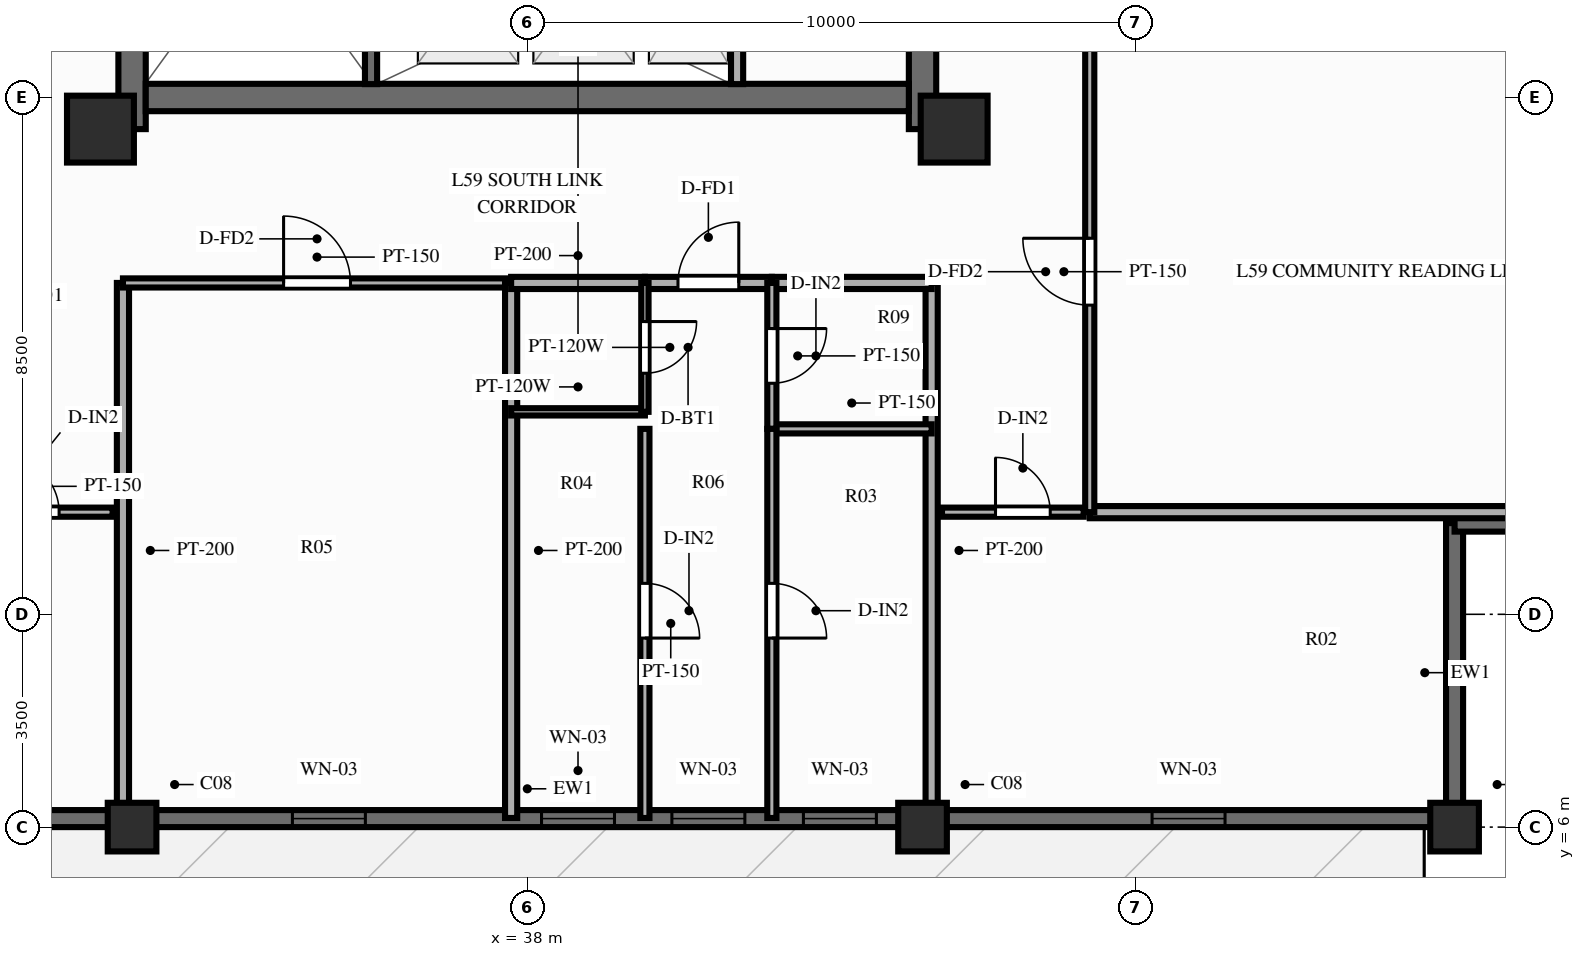
"""IFC4 building model, lengths in metres.
Left out: names, types, materials, properties, quantities, classifications, styles, units other than length and angle.
Written with IfcOpenShell. Run it as: python <this file> out.ifc"""

import sys

from ifc_helpers import new_model, si_unit, direction, frame, frame_2d, origin, origin_2d, place, context, subcontext, project, spatial, rectangle, extrude, source, transform, mapped, element, fill, save


model = new_model("IFC4")
c1 = context("Model", 3, precision=1e-05, world=origin(), true_north=direction((0.0, 1.0)))
c2 = subcontext(c1, "Body", "Model", "MODEL_VIEW")
j1 = project(units=[si_unit("LENGTHUNIT", "METRE"), si_unit("PLANEANGLEUNIT", "RADIAN")], contexts=[c1])
p1 = place(None, origin())
s1 = spatial("IfcSite", under=j1, at=p1, CompositionType="ELEMENT")
p2 = place(p1, origin())
s2 = spatial("IfcBuilding", under=s1, at=p2, CompositionType="ELEMENT")
p3 = place(p2, frame((0.0, 0.0, 189.7)))
s3 = spatial("IfcBuildingStorey", under=s2, at=p3, CompositionType="ELEMENT", Elevation=189.7)
p4 = place(p3, frame((31.5, 17.48, 0.0), z_axis=(0.0, 0.0, 1.0), x_axis=(0.0, 1.0, 0.0)))
e1 = element("IfcWall", 1, at=p4, inside=s3, PredefinedType="SHEAR", context=c2, shape_type="SweptSolid", body=[
    extrude(rectangle(XDim=19.04, YDim=0.45, at=frame_2d((9.52, 0.0))), origin(), (0.0, 0.0, 1.0), 3.0),
])
p5 = place(p4, frame((6.32, 0.0, 0.0)))
e2 = element("IfcOpeningElement", 2, at=p5, cuts=e1, PredefinedType="OPENING", context=c2, shape_type="SweptSolid", body=[
    extrude(rectangle(XDim=1.1, YDim=2.15, at=frame_2d((0.55, 1.075))), frame((0.0, 0.237, 0.0), z_axis=(0.0, -1.0, 0.0), x_axis=(1.0, 0.0, 0.0)), (0.0, 0.0, 1.0), 0.474),
])
p6 = place(p3, frame((44.5, 17.48, 0.0), z_axis=(0.0, 0.0, 1.0), x_axis=(0.0, 1.0, 0.0)))
e3 = element("IfcWall", 3, at=p6, inside=s3, PredefinedType="SHEAR", context=c2, shape_type="SweptSolid", body=[
    extrude(rectangle(XDim=19.04, YDim=0.45, at=frame_2d((9.52, 0.0))), origin(), (0.0, 0.0, 1.0), 3.0),
])
p7 = place(p6, frame((12.67, 0.0, 0.0), z_axis=(0.0, 0.0, 1.0), x_axis=(-1.0, 0.0, 0.0)))
e4 = element("IfcOpeningElement", 4, at=p7, cuts=e3, PredefinedType="OPENING", context=c2, shape_type="SweptSolid", body=[
    extrude(rectangle(XDim=1.1, YDim=2.15, at=frame_2d((0.55, 1.075))), frame((0.0, 0.237, 0.0), z_axis=(0.0, -1.0, 0.0), x_axis=(1.0, 0.0, 0.0)), (0.0, 0.0, 1.0), 0.474),
])
p8 = place(p3, frame((31.725, 18.0, 0.0), z_axis=(0.0, 0.0, 1.0), x_axis=(1.0, 0.0, 0.0)))
e5 = element("IfcWall", 5, at=p8, inside=s3, PredefinedType="SHEAR", context=c2, shape_type="SweptSolid", body=[
    extrude(rectangle(XDim=12.55, YDim=0.45, at=frame_2d((6.275, 0.0))), origin(), (0.0, 0.0, 1.0), 3.0),
])
m1 = source(origin(), c2, "Body", "SweptSolid", [
    extrude(rectangle(XDim=1.1, YDim=1.1, at=origin_2d()), origin(), (0.0, 0.0, 1.0), 3.0),
])
for number, where, z_axis, x_axis in (
    (6, (30.98, 17.48, 0.0), (0.0, 0.0, 1.0), (1.0, 0.0, 0.0)),
    (7, (45.02, 17.48, 0.0), (0.0, 0.0, 1.0), (1.0, 0.0, 0.0)),
):
    element("IfcColumn", number, at=place(p3, frame(where, z_axis=z_axis, x_axis=x_axis)), inside=s3, PredefinedType="COLUMN", context=c2, shape_type="MappedRepresentation", body=[
        mapped(m1, transform((0.0, 0.0, 0.0), scale=1.0)),
    ])
m2 = source(origin(), c2, "Body", "SweptSolid", [
    extrude(rectangle(XDim=0.8, YDim=0.8, at=origin_2d()), origin(), (0.0, 0.0, 1.0), 3.0),
])
for number, where, z_axis, x_axis in (
    (8, (31.5, 6.0, 0.0), (0.0, 0.0, 1.0), (1.0, 0.0, 0.0)),
    (9, (44.5, 6.0, 0.0), (0.0, 0.0, 1.0), (1.0, 0.0, 0.0)),
    (10, (53.25, 6.0, 0.0), (0.0, 0.0, 1.0), (1.0, 0.0, 0.0)),
):
    element("IfcColumn", number, at=place(p3, frame(where, z_axis=z_axis, x_axis=x_axis)), inside=s3, PredefinedType="COLUMN", context=c2, shape_type="MappedRepresentation", body=[
        mapped(m2, transform((0.0, 0.0, 0.0), scale=1.0)),
    ])
p9 = place(p3, frame((22.75, 6.14, 0.0), z_axis=(0.0, 0.0, 1.0), x_axis=(1.0, 0.0, 0.0)))
e11 = element("IfcWall", 11, at=p9, inside=s3, PredefinedType="SOLIDWALL", context=c2, shape_type="SweptSolid", body=[
    extrude(rectangle(XDim=30.5, YDim=0.28, at=frame_2d((15.25, 0.0))), origin(), (0.0, 0.0, 1.0), 2.28),
])
p10 = place(p9, frame((4.925, 0.0, 0.0), z_axis=(0.0, 0.0, 1.0), x_axis=(-1.0, 0.0, 0.0)))
e12 = element("IfcOpeningElement", 12, at=p10, cuts=e11, PredefinedType="OPENING", context=c2, shape_type="SweptSolid", body=[
    extrude(rectangle(XDim=1.1, YDim=2.15, at=frame_2d((0.55, 1.075))), frame((0.0, 0.152, 0.0), z_axis=(0.0, -1.0, 0.0), x_axis=(1.0, 0.0, 0.0)), (0.0, 0.0, 1.0), 0.304),
])
p11 = place(p9, frame((11.387, 0.0, 0.25)))
e13 = element("IfcOpeningElement", 13, at=p11, cuts=e11, PredefinedType="OPENING", context=c2, shape_type="SweptSolid", body=[
    extrude(rectangle(XDim=1.2, YDim=1.5, at=frame_2d((0.6, 0.75))), frame((0.0, 0.152, 0.0), z_axis=(0.0, -1.0, 0.0), x_axis=(1.0, 0.0, 0.0)), (0.0, 0.0, 1.0), 0.304),
])
p12 = place(p9, frame((15.484, 0.0, 0.25)))
e14 = element("IfcOpeningElement", 14, at=p12, cuts=e11, PredefinedType="OPENING", context=c2, shape_type="SweptSolid", body=[
    extrude(rectangle(XDim=1.2, YDim=1.5, at=frame_2d((0.6, 0.75))), frame((0.0, 0.152, 0.0), z_axis=(0.0, -1.0, 0.0), x_axis=(1.0, 0.0, 0.0)), (0.0, 0.0, 1.0), 0.304),
])
p13 = place(p9, frame((17.628, 0.0, 0.25)))
e15 = element("IfcOpeningElement", 15, at=p13, cuts=e11, PredefinedType="OPENING", context=c2, shape_type="SweptSolid", body=[
    extrude(rectangle(XDim=1.2, YDim=1.5, at=frame_2d((0.6, 0.75))), frame((0.0, 0.152, 0.0), z_axis=(0.0, -1.0, 0.0), x_axis=(1.0, 0.0, 0.0)), (0.0, 0.0, 1.0), 0.304),
])
p14 = place(p9, frame((19.791, 0.0, 0.25)))
e16 = element("IfcOpeningElement", 16, at=p14, cuts=e11, PredefinedType="OPENING", context=c2, shape_type="SweptSolid", body=[
    extrude(rectangle(XDim=1.2, YDim=1.5, at=frame_2d((0.6, 0.75))), frame((0.0, 0.152, 0.0), z_axis=(0.0, -1.0, 0.0), x_axis=(1.0, 0.0, 0.0)), (0.0, 0.0, 1.0), 0.304),
])
p15 = place(p9, frame((25.525, 0.0, 0.25)))
e17 = element("IfcOpeningElement", 17, at=p15, cuts=e11, PredefinedType="OPENING", context=c2, shape_type="SweptSolid", body=[
    extrude(rectangle(XDim=1.2, YDim=1.5, at=frame_2d((0.6, 0.75))), frame((0.0, 0.152, 0.0), z_axis=(0.0, -1.0, 0.0), x_axis=(1.0, 0.0, 0.0)), (0.0, 0.0, 1.0), 0.304),
])
for number, where, z_axis, x_axis in (
    (18, (53.25, 6.08, 0.0), (0.0, 0.0, 1.0), (0.0, 1.0, 0.0)),
    (19, (53.25, 11.0, 0.0), (0.0, 0.0, 1.0), (1.0, 0.0, 0.0)),
):
    element("IfcWall", number, at=place(p3, frame(where, z_axis=z_axis, x_axis=x_axis)), inside=s3, PredefinedType="SOLIDWALL", context=c2, shape_type="SweptSolid", body=[
        extrude(rectangle(XDim=4.92, YDim=0.28, at=frame_2d((2.46, 0.0))), origin(), (0.0, 0.0, 1.0), 2.28),
    ])
p16 = place(p3, frame((41.45, 18.22, 0.0), z_axis=(0.0, 0.0, 1.0), x_axis=(0.0, 1.0, 0.0)))
e20 = element("IfcWall", 20, at=p16, inside=s3, PredefinedType="PARTITIONING", context=c2, shape_type="SweptSolid", body=[
    extrude(rectangle(XDim=2.96, YDim=0.2, at=frame_2d((1.48, 0.0))), origin(), (0.0, 0.0, 1.0), 2.79),
])
p17 = place(p3, frame((35.43, 18.22, 0.0), z_axis=(0.0, 0.0, 1.0), x_axis=(0.0, 1.0, 0.0)))
e21 = element("IfcWall", 21, at=p17, inside=s3, PredefinedType="SOLIDWALL", context=c2, shape_type="SweptSolid", body=[
    extrude(rectangle(XDim=7.22, YDim=0.2, at=frame_2d((3.61, 0.0))), origin(), (0.0, 0.0, 1.0), 2.79),
])
p18 = place(p17, frame((6.68, 0.0, 0.0), z_axis=(0.0, 0.0, 1.0), x_axis=(-1.0, 0.0, 0.0)))
e22 = element("IfcOpeningElement", 22, at=p18, cuts=e21, PredefinedType="OPENING", context=c2, shape_type="SweptSolid", body=[
    extrude(rectangle(XDim=1.1, YDim=2.15, at=frame_2d((0.55, 1.075))), frame((0.0, 0.112, 0.0), z_axis=(0.0, -1.0, 0.0), x_axis=(1.0, 0.0, 0.0)), (0.0, 0.0, 1.0), 0.224),
])
p19 = place(p3, frame((28.85, 11.18, 0.0), z_axis=(0.0, 0.0, 1.0), x_axis=(1.0, 0.0, 0.0)))
e23 = element("IfcWall", 23, at=p19, inside=s3, PredefinedType="PARTITIONING", context=c2, shape_type="SweptSolid", body=[
    extrude(rectangle(XDim=2.33, YDim=0.15, at=frame_2d((1.165, 0.0))), origin(), (0.0, 0.0, 1.0), 2.79),
])
p20 = place(p19, frame((0.55, 0.0, 0.0)))
e24 = element("IfcOpeningElement", 24, at=p20, cuts=e23, PredefinedType="OPENING", context=c2, shape_type="SweptSolid", body=[
    extrude(rectangle(XDim=0.9, YDim=2.1, at=frame_2d((0.45, 1.05))), frame((0.0, 0.087, 0.0), z_axis=(0.0, -1.0, 0.0), x_axis=(1.0, 0.0, 0.0)), (0.0, 0.0, 1.0), 0.174),
])
p21 = place(p3, frame((44.82, 11.18, 0.0), z_axis=(0.0, 0.0, 1.0), x_axis=(1.0, 0.0, 0.0)))
e25 = element("IfcWall", 25, at=p21, inside=s3, PredefinedType="PARTITIONING", context=c2, shape_type="SweptSolid", body=[
    extrude(rectangle(XDim=2.33, YDim=0.15, at=frame_2d((1.165, 0.0))), origin(), (0.0, 0.0, 1.0), 2.79),
])
p22 = place(p21, frame((0.88, 0.0, 0.0)))
e26 = element("IfcOpeningElement", 26, at=p22, cuts=e25, PredefinedType="OPENING", context=c2, shape_type="SweptSolid", body=[
    extrude(rectangle(XDim=0.9, YDim=2.1, at=frame_2d((0.45, 1.05))), frame((0.0, 0.087, 0.0), z_axis=(0.0, -1.0, 0.0), x_axis=(1.0, 0.0, 0.0)), (0.0, 0.0, 1.0), 0.174),
])
for number, where, z_axis, x_axis in (
    (27, (31.35, 14.95, 0.0), (0.0, 0.0, 1.0), (0.0, -1.0, 0.0)),
    (28, (44.65, 14.95, 0.0), (0.0, 0.0, 1.0), (0.0, -1.0, 0.0)),
):
    element("IfcWall", number, at=place(p3, frame(where, z_axis=z_axis, x_axis=x_axis)), inside=s3, PredefinedType="PARTITIONING", context=c2, shape_type="SweptSolid", body=[
        extrude(rectangle(XDim=8.8, YDim=0.2, at=frame_2d((4.4, 0.0))), origin(), (0.0, 0.0, 1.0), 2.39),
    ])
p23 = place(p3, frame((31.35, 14.95, 0.0), z_axis=(0.0, 0.0, 1.0), x_axis=(1.0, 0.0, 0.0)))
e29 = element("IfcWall", 29, at=p23, inside=s3, PredefinedType="PARTITIONING", context=c2, shape_type="SweptSolid", body=[
    extrude(rectangle(XDim=6.384, YDim=0.15, at=frame_2d((3.192, 0.0))), origin(), (0.0, 0.0, 1.0), 2.79),
])
p24 = place(p23, frame((2.642, 0.0, 0.0)))
e30 = element("IfcOpeningElement", 30, at=p24, cuts=e29, PredefinedType="OPENING", context=c2, shape_type="SweptSolid", body=[
    extrude(rectangle(XDim=1.1, YDim=2.15, at=frame_2d((0.55, 1.075))), frame((0.0, 0.087, 0.0), z_axis=(0.0, -1.0, 0.0), x_axis=(1.0, 0.0, 0.0)), (0.0, 0.0, 1.0), 0.174),
])
p25 = place(p3, frame((37.734, 14.95, 0.0), z_axis=(0.0, 0.0, 1.0), x_axis=(0.0, -1.0, 0.0)))
e31 = element("IfcWall", 31, at=p25, inside=s3, PredefinedType="PARTITIONING", context=c2, shape_type="SweptSolid", body=[
    extrude(rectangle(XDim=8.8, YDim=0.2, at=frame_2d((4.4, 0.0))), origin(), (0.0, 0.0, 1.0), 2.79),
])
p26 = place(p3, frame((37.734, 14.95, 0.0), z_axis=(0.0, 0.0, 1.0), x_axis=(1.0, 0.0, 0.0)))
e32 = element("IfcWall", 32, at=p26, inside=s3, PredefinedType="PARTITIONING", context=c2, shape_type="SweptSolid", body=[
    extrude(rectangle(XDim=2.2, YDim=0.2, at=frame_2d((1.1, 0.0))), origin(), (0.0, 0.0, 1.0), 2.79),
])
p27 = place(p3, frame((39.934, 14.95, 0.0), z_axis=(0.0, 0.0, 1.0), x_axis=(1.0, 0.0, 0.0)))
e33 = element("IfcWall", 33, at=p27, inside=s3, PredefinedType="PARTITIONING", context=c2, shape_type="SweptSolid", body=[
    extrude(rectangle(XDim=2.088, YDim=0.2, at=frame_2d((1.044, 0.0))), origin(), (0.0, 0.0, 1.0), 2.79),
])
p28 = place(p27, frame((0.544, 0.0, 0.0)))
e34 = element("IfcOpeningElement", 34, at=p28, cuts=e33, PredefinedType="OPENING", context=c2, shape_type="SweptSolid", body=[
    extrude(rectangle(XDim=1.0, YDim=2.15, at=frame_2d((0.5, 1.075))), frame((0.0, 0.112, 0.0), z_axis=(0.0, -1.0, 0.0), x_axis=(1.0, 0.0, 0.0)), (0.0, 0.0, 1.0), 0.224),
])
p29 = place(p3, frame((42.022, 14.95, 0.0), z_axis=(0.0, 0.0, 1.0), x_axis=(1.0, 0.0, 0.0)))
e35 = element("IfcWall", 35, at=p29, inside=s3, PredefinedType="PARTITIONING", context=c2, shape_type="SweptSolid", body=[
    extrude(rectangle(XDim=2.628, YDim=0.2, at=frame_2d((1.314, 0.0))), origin(), (0.0, 0.0, 1.0), 2.79),
])
p30 = place(p3, frame((37.734, 12.83, 0.0), z_axis=(0.0, 0.0, 1.0), x_axis=(1.0, 0.0, 0.0)))
e36 = element("IfcWall", 36, at=p30, inside=s3, PredefinedType="PARTITIONING", context=c2, shape_type="SweptSolid", body=[
    extrude(rectangle(XDim=2.2, YDim=0.12, at=frame_2d((1.1, 0.0))), origin(), (0.0, 0.0, 1.0), 2.79),
])
p31 = place(p3, frame((42.022, 12.55, 0.0), z_axis=(0.0, 0.0, 1.0), x_axis=(1.0, 0.0, 0.0)))
e37 = element("IfcWall", 37, at=p31, inside=s3, PredefinedType="PARTITIONING", context=c2, shape_type="SweptSolid", body=[
    extrude(rectangle(XDim=2.628, YDim=0.15, at=frame_2d((1.314, 0.0))), origin(), (0.0, 0.0, 1.0), 2.79),
])
p32 = place(p3, frame((39.934, 14.95, 0.0), z_axis=(0.0, 0.0, 1.0), x_axis=(0.0, -1.0, 0.0)))
e38 = element("IfcWall", 38, at=p32, inside=s3, PredefinedType="PARTITIONING", context=c2, shape_type="SweptSolid", body=[
    extrude(rectangle(XDim=2.12, YDim=0.12, at=frame_2d((1.06, 0.0))), origin(), (0.0, 0.0, 1.0), 2.79),
])
p33 = place(p32, frame((0.635, 0.0, 0.0)))
e39 = element("IfcOpeningElement", 39, at=p33, cuts=e38, PredefinedType="OPENING", context=c2, shape_type="SweptSolid", body=[
    extrude(rectangle(XDim=0.85, YDim=2.05, at=frame_2d((0.425, 1.025))), frame((0.0, 0.072, 0.0), z_axis=(0.0, -1.0, 0.0), x_axis=(1.0, 0.0, 0.0)), (0.0, 0.0, 1.0), 0.144),
])
p34 = place(p3, frame((39.934, 12.55, 0.0), z_axis=(0.0, 0.0, 1.0), x_axis=(0.0, -1.0, 0.0)))
e40 = element("IfcWall", 40, at=p34, inside=s3, PredefinedType="PARTITIONING", context=c2, shape_type="SweptSolid", body=[
    extrude(rectangle(XDim=6.4, YDim=0.15, at=frame_2d((3.2, 0.0))), origin(), (0.0, 0.0, 1.0), 2.79),
])
p35 = place(p34, frame((2.541, 0.0, 0.0)))
e41 = element("IfcOpeningElement", 41, at=p35, cuts=e40, PredefinedType="OPENING", context=c2, shape_type="SweptSolid", body=[
    extrude(rectangle(XDim=0.9, YDim=2.1, at=frame_2d((0.45, 1.05))), frame((0.0, 0.087, 0.0), z_axis=(0.0, -1.0, 0.0), x_axis=(1.0, 0.0, 0.0)), (0.0, 0.0, 1.0), 0.174),
])
p36 = place(p3, frame((42.022, 14.95, 0.0), z_axis=(0.0, 0.0, 1.0), x_axis=(0.0, -1.0, 0.0)))
e42 = element("IfcWall", 42, at=p36, inside=s3, PredefinedType="PARTITIONING", context=c2, shape_type="SweptSolid", body=[
    extrude(rectangle(XDim=2.4, YDim=0.15, at=frame_2d((1.2, 0.0))), origin(), (0.0, 0.0, 1.0), 2.79),
])
p37 = place(p36, frame((0.75, 0.0, 0.0)))
e43 = element("IfcOpeningElement", 43, at=p37, cuts=e42, PredefinedType="OPENING", context=c2, shape_type="SweptSolid", body=[
    extrude(rectangle(XDim=0.9, YDim=2.1, at=frame_2d((0.45, 1.05))), frame((0.0, 0.087, 0.0), z_axis=(0.0, -1.0, 0.0), x_axis=(1.0, 0.0, 0.0)), (0.0, 0.0, 1.0), 0.174),
])
p38 = place(p3, frame((42.022, 12.55, 0.0), z_axis=(0.0, 0.0, 1.0), x_axis=(0.0, -1.0, 0.0)))
e44 = element("IfcWall", 44, at=p38, inside=s3, PredefinedType="PARTITIONING", context=c2, shape_type="SweptSolid", body=[
    extrude(rectangle(XDim=6.4, YDim=0.15, at=frame_2d((3.2, 0.0))), origin(), (0.0, 0.0, 1.0), 2.79),
])
p39 = place(p38, frame((2.541, 0.0, 0.0)))
e45 = element("IfcOpeningElement", 45, at=p39, cuts=e44, PredefinedType="OPENING", context=c2, shape_type="SweptSolid", body=[
    extrude(rectangle(XDim=0.9, YDim=2.1, at=frame_2d((0.45, 1.05))), frame((0.0, 0.087, 0.0), z_axis=(0.0, -1.0, 0.0), x_axis=(1.0, 0.0, 0.0)), (0.0, 0.0, 1.0), 0.174),
])
p40 = place(p3, frame((47.25, 11.18, 0.0), z_axis=(0.0, 0.0, 1.0), x_axis=(1.0, 0.0, 0.0)))
e46 = element("IfcWall", 46, at=p40, inside=s3, PredefinedType="PARTITIONING", context=c2, shape_type="SweptSolid", body=[
    extrude(rectangle(XDim=10.85, YDim=0.2, at=frame_2d((5.425, 0.0))), origin(), (0.0, 0.0, 1.0), 2.79),
])
p41 = place(p3, frame((47.25, 11.18, 0.0), z_axis=(0.0, 0.0, 1.0), x_axis=(0.0, 1.0, 0.0)))
e47 = element("IfcWall", 47, at=p41, inside=s3, PredefinedType="PARTITIONING", context=c2, shape_type="SweptSolid", body=[
    extrude(rectangle(XDim=7.91, YDim=0.15, at=frame_2d((3.955, 0.0))), origin(), (0.0, 0.0, 1.0), 2.79),
])
p42 = place(p41, frame((3.405, 0.0, 0.0)))
e48 = element("IfcOpeningElement", 48, at=p42, cuts=e47, PredefinedType="OPENING", context=c2, shape_type="SweptSolid", body=[
    extrude(rectangle(XDim=1.1, YDim=2.15, at=frame_2d((0.55, 1.075))), frame((0.0, 0.087, 0.0), z_axis=(0.0, -1.0, 0.0), x_axis=(1.0, 0.0, 0.0)), (0.0, 0.0, 1.0), 0.174),
])
m3 = source(origin(), c2, "Body", "SweptSolid", [
    extrude(rectangle(XDim=1.2, YDim=1.5, at=frame_2d((0.6, 0.75))), frame((0.0, 0.03, 0.0), z_axis=(0.0, -1.0, 0.0), x_axis=(1.0, 0.0, 0.0)), (0.0, 0.0, 1.0), 0.06),
])
p43 = place(p11, origin())
e49 = element("IfcWindow", 49, at=p43, inside=s3, PartitioningType="SINGLE_PANEL", PredefinedType="WINDOW", context=c2, shape_type="MappedRepresentation", body=[
    mapped(m3, transform((0.0, 0.0, 0.0), scale=1.0)),
])
fill(e13, e49)
p44 = place(p12, origin())
e50 = element("IfcWindow", 50, at=p44, inside=s3, PartitioningType="SINGLE_PANEL", PredefinedType="WINDOW", context=c2, shape_type="MappedRepresentation", body=[
    mapped(m3, transform((0.0, 0.0, 0.0), scale=1.0)),
])
fill(e14, e50)
p45 = place(p13, origin())
e51 = element("IfcWindow", 51, at=p45, inside=s3, PartitioningType="SINGLE_PANEL", PredefinedType="WINDOW", context=c2, shape_type="MappedRepresentation", body=[
    mapped(m3, transform((0.0, 0.0, 0.0), scale=1.0)),
])
fill(e15, e51)
p46 = place(p14, origin())
e52 = element("IfcWindow", 52, at=p46, inside=s3, PartitioningType="SINGLE_PANEL", PredefinedType="WINDOW", context=c2, shape_type="MappedRepresentation", body=[
    mapped(m3, transform((0.0, 0.0, 0.0), scale=1.0)),
])
fill(e16, e52)
p47 = place(p15, origin())
e53 = element("IfcWindow", 53, at=p47, inside=s3, PartitioningType="SINGLE_PANEL", PredefinedType="WINDOW", context=c2, shape_type="MappedRepresentation", body=[
    mapped(m3, transform((0.0, 0.0, 0.0), scale=1.0)),
])
fill(e17, e53)
m4 = source(origin(), c2, "Body", "SweptSolid", [
    extrude(rectangle(XDim=0.9, YDim=2.1, at=frame_2d((0.45, 1.05))), frame((0.0, 0.025, 0.0), z_axis=(0.0, -1.0, 0.0), x_axis=(1.0, 0.0, 0.0)), (0.0, 0.0, 1.0), 0.05),
])
p48 = place(p20, origin())
e54 = element("IfcDoor", 54, at=p48, inside=s3, OperationType="SINGLE_SWING_LEFT", PredefinedType="DOOR", context=c2, shape_type="MappedRepresentation", body=[
    mapped(m4, transform((0.0, 0.0, 0.0), scale=1.0)),
])
fill(e24, e54)
p49 = place(p22, origin())
e55 = element("IfcDoor", 55, at=p49, inside=s3, OperationType="SINGLE_SWING_LEFT", PredefinedType="DOOR", context=c2, shape_type="MappedRepresentation", body=[
    mapped(m4, transform((0.0, 0.0, 0.0), scale=1.0)),
])
fill(e26, e55)
m5 = source(origin(), c2, "Body", "SweptSolid", [
    extrude(rectangle(XDim=1.1, YDim=2.15, at=frame_2d((0.55, 1.075))), frame((0.0, 0.025, 0.0), z_axis=(0.0, -1.0, 0.0), x_axis=(1.0, 0.0, 0.0)), (0.0, 0.0, 1.0), 0.05),
])
p50 = place(p24, origin())
e56 = element("IfcDoor", 56, at=p50, inside=s3, OperationType="SINGLE_SWING_LEFT", PredefinedType="DOOR", context=c2, shape_type="MappedRepresentation", body=[
    mapped(m5, transform((0.0, 0.0, 0.0), scale=1.0)),
])
fill(e30, e56)
m6 = source(origin(), c2, "Body", "SweptSolid", [
    extrude(rectangle(XDim=1.0, YDim=2.15, at=frame_2d((0.5, 1.075))), frame((0.0, 0.025, 0.0), z_axis=(0.0, -1.0, 0.0), x_axis=(1.0, 0.0, 0.0)), (0.0, 0.0, 1.0), 0.05),
])
p51 = place(p28, origin())
e57 = element("IfcDoor", 57, at=p51, inside=s3, OperationType="SINGLE_SWING_RIGHT", PredefinedType="DOOR", context=c2, shape_type="MappedRepresentation", body=[
    mapped(m6, transform((0.0, 0.0, 0.0), scale=1.0)),
])
fill(e34, e57)
m7 = source(origin(), c2, "Body", "SweptSolid", [
    extrude(rectangle(XDim=0.85, YDim=2.05, at=frame_2d((0.425, 1.025))), frame((0.0, 0.025, 0.0), z_axis=(0.0, -1.0, 0.0), x_axis=(1.0, 0.0, 0.0)), (0.0, 0.0, 1.0), 0.05),
])
p52 = place(p33, origin())
e58 = element("IfcDoor", 58, at=p52, inside=s3, OperationType="SINGLE_SWING_LEFT", PredefinedType="DOOR", context=c2, shape_type="MappedRepresentation", body=[
    mapped(m7, transform((0.0, 0.0, 0.0), scale=1.0)),
])
fill(e39, e58)
p53 = place(p35, origin())
e59 = element("IfcDoor", 59, at=p53, inside=s3, OperationType="SINGLE_SWING_RIGHT", PredefinedType="DOOR", context=c2, shape_type="MappedRepresentation", body=[
    mapped(m4, transform((0.0, 0.0, 0.0), scale=1.0)),
])
fill(e41, e59)
p54 = place(p37, origin())
e60 = element("IfcDoor", 60, at=p54, inside=s3, OperationType="SINGLE_SWING_LEFT", PredefinedType="DOOR", context=c2, shape_type="MappedRepresentation", body=[
    mapped(m4, transform((0.0, 0.0, 0.0), scale=1.0)),
])
fill(e43, e60)
p55 = place(p39, origin())
e61 = element("IfcDoor", 61, at=p55, inside=s3, OperationType="SINGLE_SWING_RIGHT", PredefinedType="DOOR", context=c2, shape_type="MappedRepresentation", body=[
    mapped(m4, transform((0.0, 0.0, 0.0), scale=1.0)),
])
fill(e45, e61)
p56 = place(p42, origin())
e62 = element("IfcDoor", 62, at=p56, inside=s3, OperationType="SINGLE_SWING_RIGHT", PredefinedType="DOOR", context=c2, shape_type="MappedRepresentation", body=[
    mapped(m5, transform((0.0, 0.0, 0.0), scale=1.0)),
])
fill(e48, e62)
save(model, sys.argv[1])
